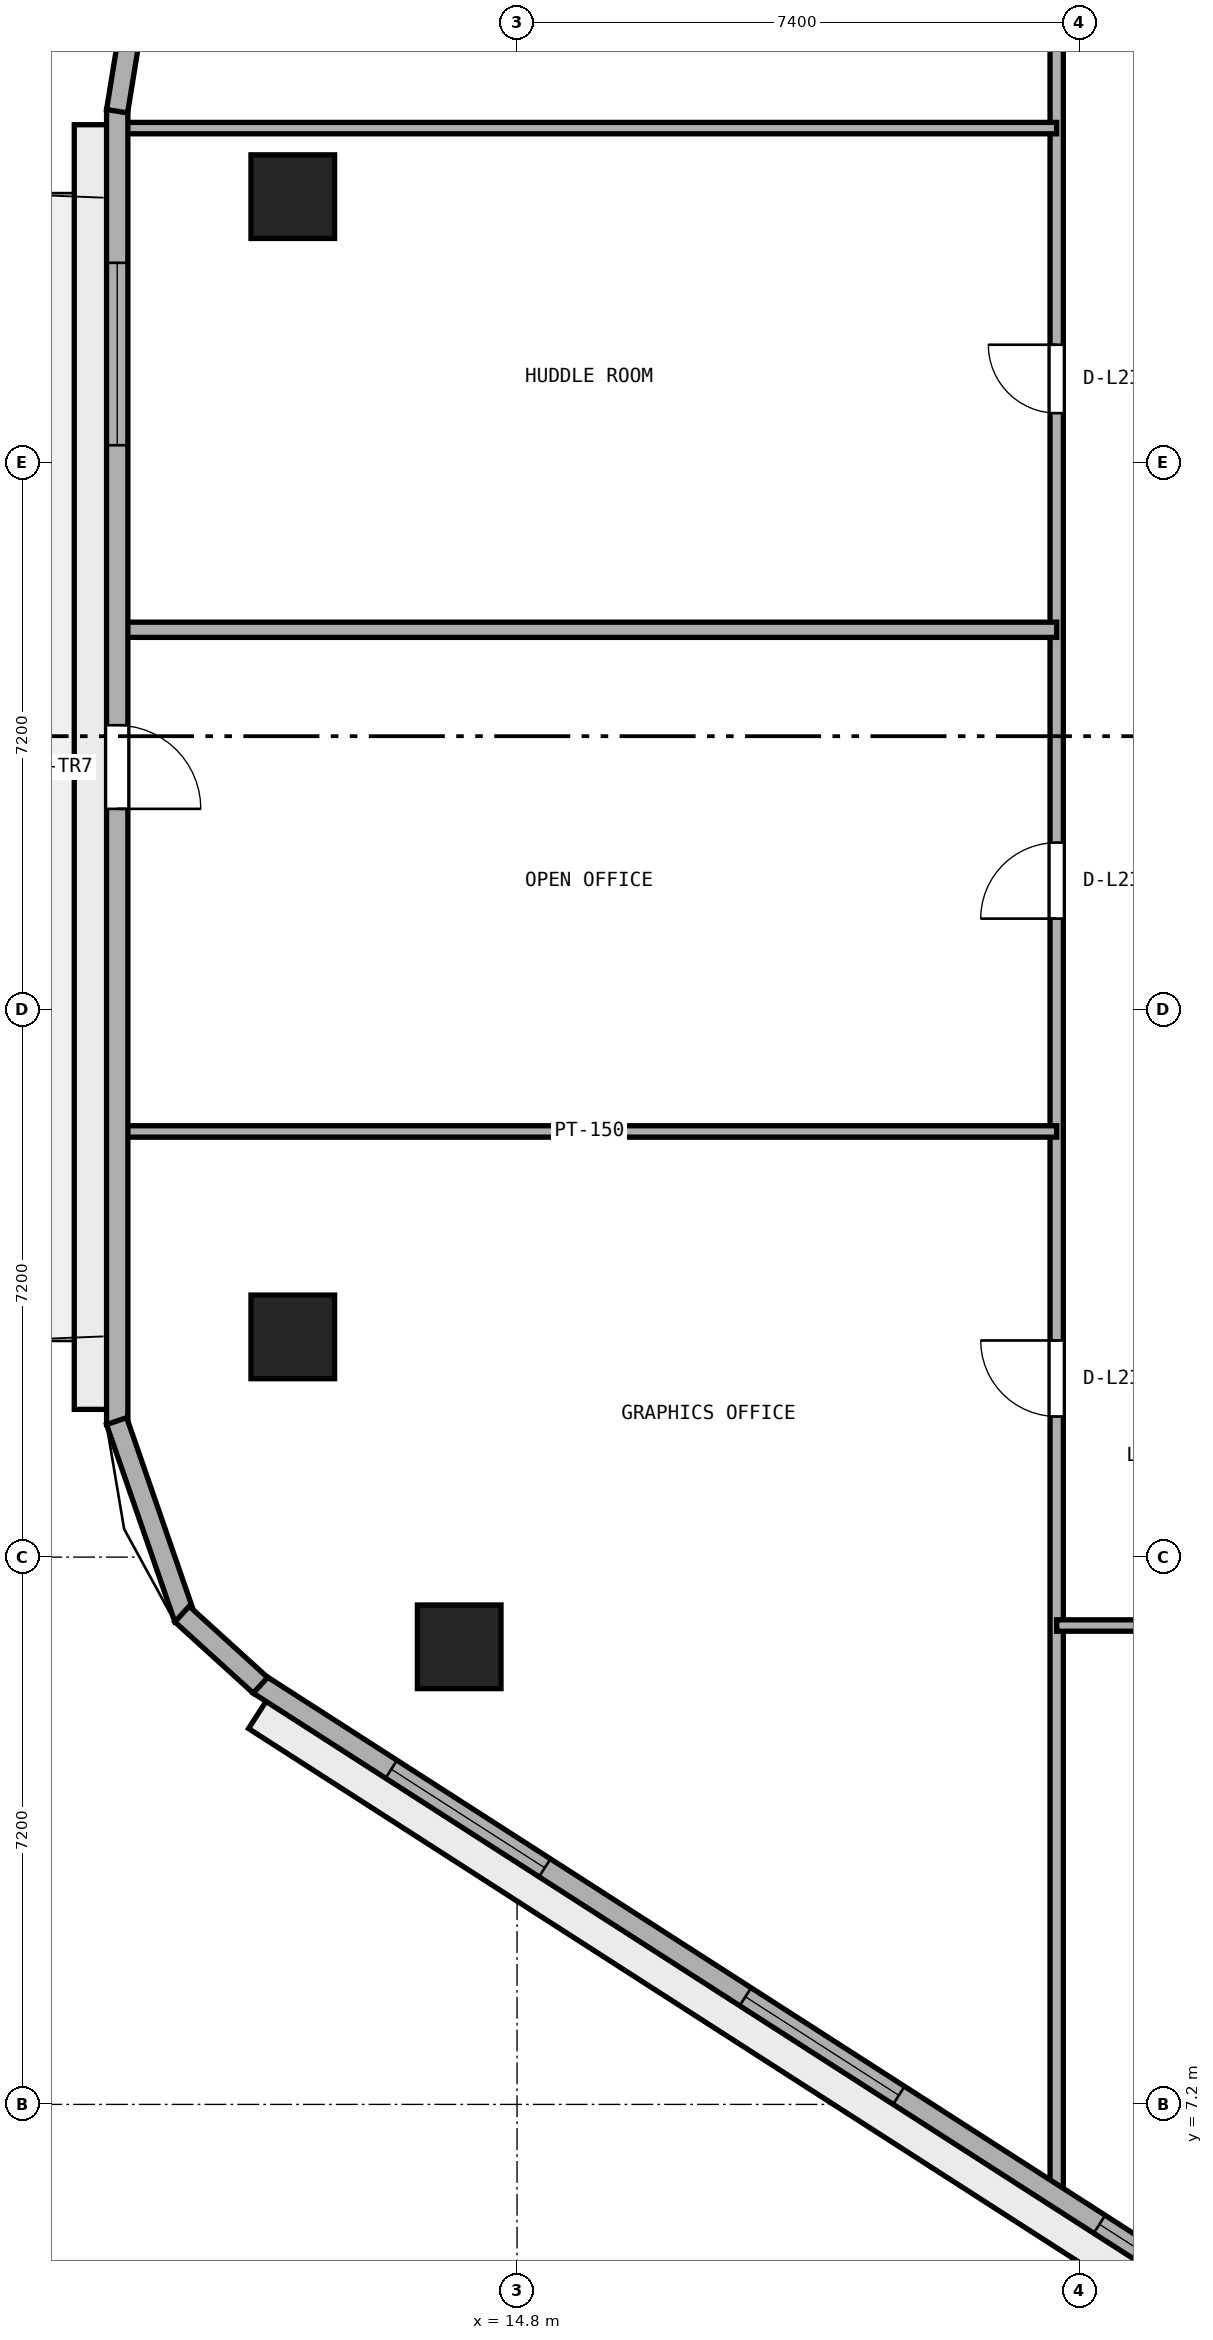
"""IFC4 building model, lengths in metres.
Left out: names, types, materials, properties, quantities, classifications, styles, units other than length and angle.
Written with IfcOpenShell. Run it as: python <this file> out.ifc"""

import sys

from ifc_helpers import new_model, si_unit, direction, frame, frame_2d, origin, origin_2d, place, context, subcontext, project, spatial, rectangle, extrude, element, fill, save


model = new_model("IFC4")
c1 = context("Model", 3, precision=1e-05, world=origin(), true_north=direction((0.0, 1.0)))
c2 = subcontext(c1, "Body", "Model", "MODEL_VIEW")
j1 = project(units=[si_unit("LENGTHUNIT", "METRE"), si_unit("PLANEANGLEUNIT", "RADIAN")], contexts=[c1])
p1 = place(None, origin())
s1 = spatial("IfcSite", under=j1, at=p1, CompositionType="ELEMENT")
p2 = place(p1, origin())
s2 = spatial("IfcBuilding", under=s1, at=p2, CompositionType="ELEMENT")
p3 = place(p2, frame((0.0, 0.0, 93.4)))
s3 = spatial("IfcBuildingStorey", under=s2, at=p3, CompositionType="ELEMENT", Elevation=93.4)
for number, where, z_axis, x_axis in (
    (1, (11.85, 32.298, 0.0), (0.0, 0.0, 1.0), (1.0, 0.0, 0.0)),
    (2, (11.85, 17.298, 0.0), (0.0, 0.0, 1.0), (1.0, 0.0, 0.0)),
    (3, (14.039, 13.22, 0.0), (0.0, 0.0, 1.0), (1.0, 0.0, 0.0)),
):
    element("IfcColumn", number, at=place(p3, frame(where, z_axis=z_axis, x_axis=x_axis)), inside=s3, PredefinedType="COLUMN", context=c2, shape_type="SweptSolid", body=[
        extrude(rectangle(XDim=1.1, YDim=1.1, at=origin_2d()), origin(), (0.0, 0.0, 1.0), 3.8),
    ])
p4 = place(p3, frame((21.9, 5.958, 0.0), z_axis=(0.0, 0.0, 1.0), x_axis=(0.0, 1.0, 0.0)))
e4 = element("IfcWall", 4, at=p4, inside=s3, PredefinedType="PARTITIONING", context=c2, shape_type="SweptSolid", body=[
    extrude(rectangle(XDim=30.942, YDim=0.175, at=frame_2d((15.471, 0.0))), origin(), (0.0, 0.0, 1.0), 3.525),
])
p5 = place(p4, frame((10.292, 0.0, 0.0)))
e5 = element("IfcOpeningElement", 5, at=p5, cuts=e4, PredefinedType="OPENING", context=c2, shape_type="SweptSolid", body=[
    extrude(rectangle(XDim=1.0, YDim=2.12, at=frame_2d((0.5, 1.06))), frame((0.0, 0.097, 0.0), z_axis=(0.0, -1.0, 0.0), x_axis=(1.0, 0.0, 0.0)), (0.0, 0.0, 1.0), 0.195),
])
p6 = place(p4, frame((16.842, 0.0, 0.0)))
e6 = element("IfcOpeningElement", 6, at=p6, cuts=e4, PredefinedType="OPENING", context=c2, shape_type="SweptSolid", body=[
    extrude(rectangle(XDim=1.0, YDim=2.12, at=frame_2d((0.5, 1.06))), frame((0.0, 0.097, 0.0), z_axis=(0.0, -1.0, 0.0), x_axis=(1.0, 0.0, 0.0)), (0.0, 0.0, 1.0), 0.195),
])
p7 = place(p4, frame((23.492, 0.0, 0.0)))
e7 = element("IfcOpeningElement", 7, at=p7, cuts=e4, PredefinedType="OPENING", context=c2, shape_type="SweptSolid", body=[
    extrude(rectangle(XDim=0.9, YDim=2.1, at=frame_2d((0.45, 1.05))), frame((0.0, 0.097, 0.0), z_axis=(0.0, -1.0, 0.0), x_axis=(1.0, 0.0, 0.0)), (0.0, 0.0, 1.0), 0.195),
])
p8 = place(p3, frame((21.9, 13.5, 0.0), z_axis=(0.0, 0.0, 1.0), x_axis=(1.0, 0.0, 0.0)))
e8 = element("IfcWall", 8, at=p8, inside=s3, PredefinedType="PARTITIONING", context=c2, shape_type="SweptSolid", body=[
    extrude(rectangle(XDim=30.2, YDim=0.15, at=frame_2d((15.1, 0.0))), origin(), (0.0, 0.0, 1.0), 3.525),
])
p9 = place(p8, frame((14.6, 0.0, 0.0)))
e9 = element("IfcOpeningElement", 9, at=p9, cuts=e8, PredefinedType="OPENING", context=c2, shape_type="SweptSolid", body=[
    extrude(rectangle(XDim=1.0, YDim=2.12, at=frame_2d((0.5, 1.06))), frame((0.0, 0.085, 0.0), z_axis=(0.0, -1.0, 0.0), x_axis=(1.0, 0.0, 0.0)), (0.0, 0.0, 1.0), 0.17),
])
p10 = place(p3, frame((9.605, 20.0, 0.0), z_axis=(0.0, 0.0, 1.0), x_axis=(1.0, 0.0, 0.0)))
e10 = element("IfcWall", 10, at=p10, inside=s3, PredefinedType="PARTITIONING", context=c2, shape_type="SweptSolid", body=[
    extrude(rectangle(XDim=12.295, YDim=0.15, at=frame_2d((6.147, 0.0))), origin(), (0.0, 0.0, 1.0), 3.525),
])
p11 = place(p3, frame((9.605, 26.6, 0.0), z_axis=(0.0, 0.0, 1.0), x_axis=(1.0, 0.0, 0.0)))
e11 = element("IfcWall", 11, at=p11, inside=s3, PredefinedType="PARTITIONING", context=c2, shape_type="SweptSolid", body=[
    extrude(rectangle(XDim=12.295, YDim=0.2, at=frame_2d((6.147, 0.0))), origin(), (0.0, 0.0, 1.0), 3.525),
])
p12 = place(p3, frame((9.605, 33.2, 0.0), z_axis=(0.0, 0.0, 1.0), x_axis=(1.0, 0.0, 0.0)))
e12 = element("IfcWall", 12, at=p12, inside=s3, PredefinedType="PARTITIONING", context=c2, shape_type="SweptSolid", body=[
    extrude(rectangle(XDim=12.294, YDim=0.15, at=frame_2d((6.147, 0.0))), origin(), (0.0, 0.0, 1.0), 3.525),
])
p13 = place(p3, frame((9.54, 33.444, 0.0), z_axis=(0.0, 0.0, 1.0), x_axis=(0.0, -1.0, 0.0)))
e13 = element("IfcWall", 13, at=p13, inside=s3, PredefinedType="STANDARD", context=c2, shape_type="SweptSolid", body=[
    extrude(rectangle(XDim=17.301, YDim=0.28, at=frame_2d((8.65, 0.0))), origin(), (0.0, 0.0, 1.0), 3.525),
])
p14 = place(p13, frame((8.1, 0.0, 0.0)))
e14 = element("IfcOpeningElement", 14, at=p14, cuts=e13, PredefinedType="OPENING", context=c2, shape_type="SweptSolid", body=[
    extrude(rectangle(XDim=1.1, YDim=2.2, at=frame_2d((0.55, 1.1))), frame((0.0, 0.15, 0.0), z_axis=(0.0, -1.0, 0.0), x_axis=(1.0, 0.0, 0.0)), (0.0, 0.0, 1.0), 0.3),
])
p15 = place(p13, frame((2.017, 0.0, 0.9)))
e15 = element("IfcOpeningElement", 15, at=p15, cuts=e13, PredefinedType="OPENING", context=c2, shape_type="SweptSolid", body=[
    extrude(rectangle(XDim=2.4, YDim=1.75, at=frame_2d((1.2, 0.875))), frame((0.0, 0.15, 0.0), z_axis=(0.0, -1.0, 0.0), x_axis=(1.0, 0.0, 0.0)), (0.0, 0.0, 1.0), 0.3),
])
p16 = place(p3, frame((11.405, 12.728, 0.0), z_axis=(0.0, 0.0, 1.0), x_axis=(0.841304564637, -0.540561402175, 0.0)))
e16 = element("IfcWall", 16, at=p16, inside=s3, PredefinedType="STANDARD", context=c2, shape_type="SweptSolid", body=[
    extrude(rectangle(XDim=17.612, YDim=0.28, at=frame_2d((8.806, 0.0))), origin(), (0.0, 0.0, 1.0), 3.525),
])
p17 = place(p16, frame((2.069, 0.0, 0.9)))
e17 = element("IfcOpeningElement", 17, at=p17, cuts=e16, PredefinedType="OPENING", context=c2, shape_type="SweptSolid", body=[
    extrude(rectangle(XDim=2.4, YDim=1.75, at=frame_2d((1.2, 0.875))), frame((0.0, 0.15, 0.0), z_axis=(0.0, -1.0, 0.0), x_axis=(1.0, 0.0, 0.0)), (0.0, 0.0, 1.0), 0.3),
])
p18 = place(p16, frame((7.606, 0.0, 0.9)))
e18 = element("IfcOpeningElement", 18, at=p18, cuts=e16, PredefinedType="OPENING", context=c2, shape_type="SweptSolid", body=[
    extrude(rectangle(XDim=2.4, YDim=1.75, at=frame_2d((1.2, 0.875))), frame((0.0, 0.15, 0.0), z_axis=(0.0, -1.0, 0.0), x_axis=(1.0, 0.0, 0.0)), (0.0, 0.0, 1.0), 0.3),
])
p19 = place(p16, frame((13.143, 0.0, 0.9)))
e19 = element("IfcOpeningElement", 19, at=p19, cuts=e16, PredefinedType="OPENING", context=c2, shape_type="SweptSolid", body=[
    extrude(rectangle(XDim=2.4, YDim=1.75, at=frame_2d((1.2, 0.875))), frame((0.0, 0.15, 0.0), z_axis=(0.0, -1.0, 0.0), x_axis=(1.0, 0.0, 0.0)), (0.0, 0.0, 1.0), 0.3),
])
p20 = place(p3, frame((9.753, 34.749, 0.0), z_axis=(0.0, 0.0, 1.0), x_axis=(-0.160037671962, -0.987110907423, 0.0)))
e20 = element("IfcWall", 20, at=p20, inside=s3, PredefinedType="STANDARD", context=c2, shape_type="SweptSolid", body=[
    extrude(rectangle(XDim=1.344, YDim=0.28, at=frame_2d((0.672, 0.0))), origin(), (0.0, 0.0, 1.0), 3.525),
])
p21 = place(p3, frame((9.532, 16.189, 0.0), z_axis=(0.0, 0.0, 1.0), x_axis=(0.32708309668, -0.944995580871, 0.0)))
e21 = element("IfcWall", 21, at=p21, inside=s3, PredefinedType="STANDARD", context=c2, shape_type="SweptSolid", body=[
    extrude(rectangle(XDim=2.748, YDim=0.28, at=frame_2d((1.374, 0.0))), origin(), (0.0, 0.0, 1.0), 3.525),
])
p22 = place(p3, frame((10.393, 13.651, 0.0), z_axis=(0.0, 0.0, 1.0), x_axis=(0.74003521851, -0.672568119498, 0.0)))
e22 = element("IfcWall", 22, at=p22, inside=s3, PredefinedType="STANDARD", context=c2, shape_type="SweptSolid", body=[
    extrude(rectangle(XDim=1.393, YDim=0.28, at=frame_2d((0.697, 0.0))), origin(), (0.0, 0.0, 1.0), 3.525),
])
p23 = place(p5, origin())
e23 = element("IfcDoor", 23, at=p23, inside=s3, OperationType="SINGLE_SWING_RIGHT", PredefinedType="DOOR", context=c2, shape_type="SweptSolid", body=[
    extrude(rectangle(XDim=1.0, YDim=2.12, at=frame_2d((0.5, 1.06))), frame((0.0, 0.025, 0.0), z_axis=(0.0, -1.0, 0.0), x_axis=(1.0, 0.0, 0.0)), (0.0, 0.0, 1.0), 0.05),
])
fill(e5, e23)
p24 = place(p6, origin())
e24 = element("IfcDoor", 24, at=p24, inside=s3, OperationType="SINGLE_SWING_LEFT", PredefinedType="DOOR", context=c2, shape_type="SweptSolid", body=[
    extrude(rectangle(XDim=1.0, YDim=2.12, at=frame_2d((0.5, 1.06))), frame((0.0, 0.025, 0.0), z_axis=(0.0, -1.0, 0.0), x_axis=(1.0, 0.0, 0.0)), (0.0, 0.0, 1.0), 0.05),
])
fill(e6, e24)
p25 = place(p7, origin())
e25 = element("IfcDoor", 25, at=p25, inside=s3, OperationType="SINGLE_SWING_RIGHT", PredefinedType="DOOR", context=c2, shape_type="SweptSolid", body=[
    extrude(rectangle(XDim=0.9, YDim=2.1, at=frame_2d((0.45, 1.05))), frame((0.0, 0.025, 0.0), z_axis=(0.0, -1.0, 0.0), x_axis=(1.0, 0.0, 0.0)), (0.0, 0.0, 1.0), 0.05),
])
fill(e7, e25)
p26 = place(p14, origin())
e26 = element("IfcDoor", 26, at=p26, inside=s3, OperationType="SINGLE_SWING_RIGHT", PredefinedType="DOOR", context=c2, shape_type="SweptSolid", body=[
    extrude(rectangle(XDim=1.1, YDim=2.2, at=frame_2d((0.55, 1.1))), frame((0.0, 0.025, 0.0), z_axis=(0.0, -1.0, 0.0), x_axis=(1.0, 0.0, 0.0)), (0.0, 0.0, 1.0), 0.05),
])
fill(e14, e26)
p27 = place(p15, origin())
e27 = element("IfcWindow", 27, at=p27, inside=s3, PartitioningType="SINGLE_PANEL", PredefinedType="WINDOW", context=c2, shape_type="SweptSolid", body=[
    extrude(rectangle(XDim=2.4, YDim=1.75, at=frame_2d((1.2, 0.875))), frame((0.0, 0.03, 0.0), z_axis=(0.0, -1.0, 0.0), x_axis=(1.0, 0.0, 0.0)), (0.0, 0.0, 1.0), 0.06),
])
fill(e15, e27)
p28 = place(p17, origin())
e28 = element("IfcWindow", 28, at=p28, inside=s3, PartitioningType="SINGLE_PANEL", PredefinedType="WINDOW", context=c2, shape_type="SweptSolid", body=[
    extrude(rectangle(XDim=2.4, YDim=1.75, at=frame_2d((1.2, 0.875))), frame((0.0, 0.03, 0.0), z_axis=(0.0, -1.0, 0.0), x_axis=(1.0, 0.0, 0.0)), (0.0, 0.0, 1.0), 0.06),
])
fill(e17, e28)
p29 = place(p18, origin())
e29 = element("IfcWindow", 29, at=p29, inside=s3, PartitioningType="SINGLE_PANEL", PredefinedType="WINDOW", context=c2, shape_type="SweptSolid", body=[
    extrude(rectangle(XDim=2.4, YDim=1.75, at=frame_2d((1.2, 0.875))), frame((0.0, 0.03, 0.0), z_axis=(0.0, -1.0, 0.0), x_axis=(1.0, 0.0, 0.0)), (0.0, 0.0, 1.0), 0.06),
])
fill(e18, e29)
p30 = place(p19, origin())
e30 = element("IfcWindow", 30, at=p30, inside=s3, PartitioningType="SINGLE_PANEL", PredefinedType="WINDOW", context=c2, shape_type="SweptSolid", body=[
    extrude(rectangle(XDim=2.4, YDim=1.75, at=frame_2d((1.2, 0.875))), frame((0.0, 0.03, 0.0), z_axis=(0.0, -1.0, 0.0), x_axis=(1.0, 0.0, 0.0)), (0.0, 0.0, 1.0), 0.06),
])
fill(e19, e30)
save(model, sys.argv[1])
